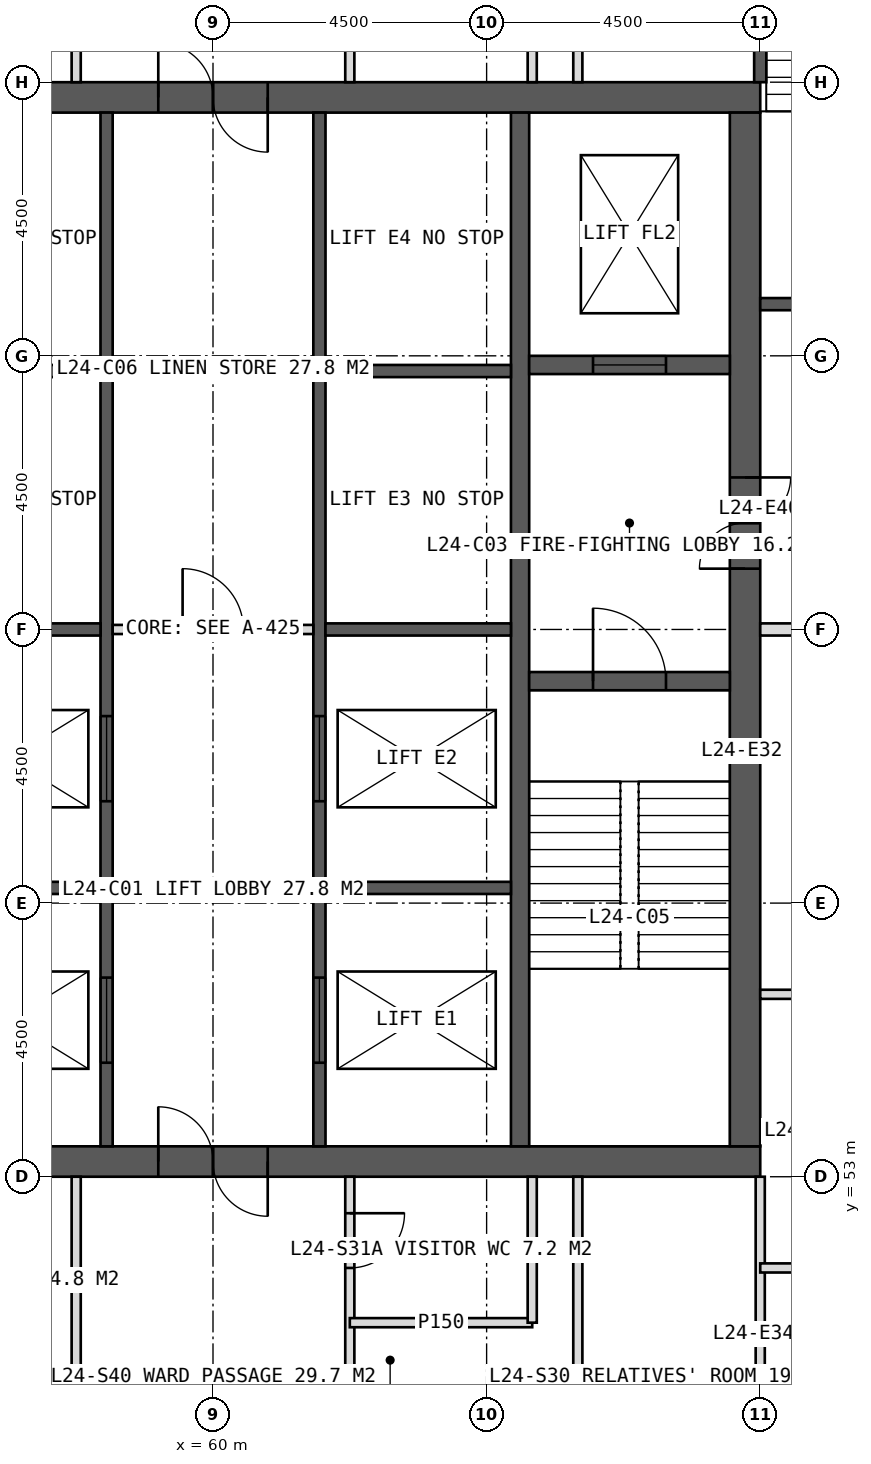
"""IFC4 building model, lengths in metres.
Left out: names, types, materials, properties, quantities, classifications, styles, units other than length and angle.
Written with IfcOpenShell. Run it as: python <this file> out.ifc"""

import sys

from ifc_helpers import new_model, si_unit, direction, frame, frame_2d, origin, place, context, subcontext, project, spatial, rectangle, extrude, element, fill, save


model = new_model("IFC4")
c1 = context("Model", 3, precision=1e-05, world=origin(), true_north=direction((0.0, 1.0)))
c2 = subcontext(c1, "Body", "Model", "MODEL_VIEW")
j1 = project(units=[si_unit("LENGTHUNIT", "METRE"), si_unit("PLANEANGLEUNIT", "RADIAN")], contexts=[c1])
p1 = place(None, origin())
s1 = spatial("IfcSite", under=j1, at=p1, CompositionType="ELEMENT")
p2 = place(p1, origin())
s2 = spatial("IfcBuilding", under=s1, at=p2, CompositionType="ELEMENT")
p3 = place(p2, frame((0.0, 0.0, 104.0)))
s3 = spatial("IfcBuildingStorey", under=s2, at=p3, CompositionType="ELEMENT", Elevation=104.0)
p4 = place(p3, frame((51.0, 70.75, 0.0), z_axis=(0.0, 0.0, 1.0), x_axis=(1.0, 0.0, 0.0)))
e1 = element("IfcWall", 1, at=p4, inside=s3, PredefinedType="SHEAR", context=c2, shape_type="SweptSolid", body=[
    extrude(rectangle(XDim=18.0, YDim=0.5, at=frame_2d((9.0, 0.0))), origin(), (0.0, 0.0, 1.0), 4.0),
])
p5 = place(p4, frame((8.1, 0.0, 0.0)))
e2 = element("IfcOpeningElement", 2, at=p5, cuts=e1, PredefinedType="OPENING", context=c2, shape_type="SweptSolid", body=[
    extrude(rectangle(XDim=1.8, YDim=2.2, at=frame_2d((0.9, 1.1))), frame((0.0, 0.26, 0.0), z_axis=(0.0, -1.0, 0.0), x_axis=(1.0, 0.0, 0.0)), (0.0, 0.0, 1.0), 0.52),
])
p6 = place(p3, frame((51.0, 53.25, 0.0), z_axis=(0.0, 0.0, 1.0), x_axis=(1.0, 0.0, 0.0)))
e3 = element("IfcWall", 3, at=p6, inside=s3, PredefinedType="SHEAR", context=c2, shape_type="SweptSolid", body=[
    extrude(rectangle(XDim=18.0, YDim=0.5, at=frame_2d((9.0, 0.0))), origin(), (0.0, 0.0, 1.0), 4.0),
])
p7 = place(p6, frame((8.1, 0.0, 0.0)))
e4 = element("IfcOpeningElement", 4, at=p7, cuts=e3, PredefinedType="OPENING", context=c2, shape_type="SweptSolid", body=[
    extrude(rectangle(XDim=1.8, YDim=2.2, at=frame_2d((0.9, 1.1))), frame((0.0, 0.26, 0.0), z_axis=(0.0, -1.0, 0.0), x_axis=(1.0, 0.0, 0.0)), (0.0, 0.0, 1.0), 0.52),
])
p8 = place(p3, frame((68.75, 53.5, 0.0), z_axis=(0.0, 0.0, 1.0), x_axis=(0.0, 1.0, 0.0)))
e5 = element("IfcWall", 5, at=p8, inside=s3, PredefinedType="SHEAR", context=c2, shape_type="SweptSolid", body=[
    extrude(rectangle(XDim=17.0, YDim=0.5, at=frame_2d((8.5, 0.0))), origin(), (0.0, 0.0, 1.0), 4.0),
])
p9 = place(p8, frame((9.5, 0.0, 0.0)))
e6 = element("IfcOpeningElement", 6, at=p9, cuts=e5, PredefinedType="OPENING", context=c2, shape_type="SweptSolid", body=[
    extrude(rectangle(XDim=1.5, YDim=2.2, at=frame_2d((0.75, 1.1))), frame((0.0, 0.26, 0.0), z_axis=(0.0, -1.0, 0.0), x_axis=(1.0, 0.0, 0.0)), (0.0, 0.0, 1.0), 0.52),
])
p10 = place(p3, frame((65.05, 53.5, 0.0), z_axis=(0.0, 0.0, 1.0), x_axis=(0.0, 1.0, 0.0)))
e7 = element("IfcWall", 7, at=p10, inside=s3, PredefinedType="SHEAR", context=c2, shape_type="SweptSolid", body=[
    extrude(rectangle(XDim=17.0, YDim=0.3, at=frame_2d((8.5, 0.0))), origin(), (0.0, 0.0, 1.0), 4.0),
])
p11 = place(p3, frame((58.25, 53.5, 0.0), z_axis=(0.0, 0.0, 1.0), x_axis=(0.0, 1.0, 0.0)))
e8 = element("IfcWall", 8, at=p11, inside=s3, PredefinedType="SHEAR", context=c2, shape_type="SweptSolid", body=[
    extrude(rectangle(XDim=17.0, YDim=0.2, at=frame_2d((8.5, 0.0))), origin(), (0.0, 0.0, 1.0), 4.0),
])
p12 = place(p11, frame((1.375, 0.0, 0.0)))
e9 = element("IfcOpeningElement", 9, at=p12, cuts=e8, PredefinedType="OPENING", context=c2, shape_type="SweptSolid", body=[
    extrude(rectangle(XDim=1.4, YDim=2.2, at=frame_2d((0.7, 1.1))), frame((0.0, 0.11, 0.0), z_axis=(0.0, -1.0, 0.0), x_axis=(1.0, 0.0, 0.0)), (0.0, 0.0, 1.0), 0.22),
])
p13 = place(p11, frame((5.675, 0.0, 0.0)))
e10 = element("IfcOpeningElement", 10, at=p13, cuts=e8, PredefinedType="OPENING", context=c2, shape_type="SweptSolid", body=[
    extrude(rectangle(XDim=1.4, YDim=2.2, at=frame_2d((0.7, 1.1))), frame((0.0, 0.11, 0.0), z_axis=(0.0, -1.0, 0.0), x_axis=(1.0, 0.0, 0.0)), (0.0, 0.0, 1.0), 0.22),
])
p14 = place(p3, frame((61.75, 53.5, 0.0), z_axis=(0.0, 0.0, 1.0), x_axis=(0.0, 1.0, 0.0)))
e11 = element("IfcWall", 11, at=p14, inside=s3, PredefinedType="SHEAR", context=c2, shape_type="SweptSolid", body=[
    extrude(rectangle(XDim=17.0, YDim=0.2, at=frame_2d((8.5, 0.0))), origin(), (0.0, 0.0, 1.0), 4.0),
])
p15 = place(p14, frame((1.375, 0.0, 0.0)))
e12 = element("IfcOpeningElement", 12, at=p15, cuts=e11, PredefinedType="OPENING", context=c2, shape_type="SweptSolid", body=[
    extrude(rectangle(XDim=1.4, YDim=2.2, at=frame_2d((0.7, 1.1))), frame((0.0, 0.11, 0.0), z_axis=(0.0, -1.0, 0.0), x_axis=(1.0, 0.0, 0.0)), (0.0, 0.0, 1.0), 0.22),
])
p16 = place(p14, frame((5.675, 0.0, 0.0)))
e13 = element("IfcOpeningElement", 13, at=p16, cuts=e11, PredefinedType="OPENING", context=c2, shape_type="SweptSolid", body=[
    extrude(rectangle(XDim=1.4, YDim=2.2, at=frame_2d((0.7, 1.1))), frame((0.0, 0.11, 0.0), z_axis=(0.0, -1.0, 0.0), x_axis=(1.0, 0.0, 0.0)), (0.0, 0.0, 1.0), 0.22),
])
for number, where, z_axis, x_axis in (
    (14, (55.1, 57.75, 0.0), (0.0, 0.0, 1.0), (1.0, 0.0, 0.0)),
    (15, (61.85, 57.75, 0.0), (0.0, 0.0, 1.0), (1.0, 0.0, 0.0)),
    (16, (55.1, 62.0, 0.0), (0.0, 0.0, 1.0), (1.0, 0.0, 0.0)),
    (17, (61.85, 62.0, 0.0), (0.0, 0.0, 1.0), (1.0, 0.0, 0.0)),
    (18, (55.1, 66.25, 0.0), (0.0, 0.0, 1.0), (1.0, 0.0, 0.0)),
    (19, (61.85, 66.25, 0.0), (0.0, 0.0, 1.0), (1.0, 0.0, 0.0)),
):
    element("IfcWall", number, at=place(p3, frame(where, z_axis=z_axis, x_axis=x_axis)), inside=s3, PredefinedType="SHEAR", context=c2, shape_type="SweptSolid", body=[
        extrude(rectangle(XDim=3.05, YDim=0.2, at=frame_2d((1.525, 0.0))), origin(), (0.0, 0.0, 1.0), 4.0),
    ])
p17 = place(p3, frame((65.2, 61.15, 0.0), z_axis=(0.0, 0.0, 1.0), x_axis=(1.0, 0.0, 0.0)))
e20 = element("IfcWall", 20, at=p17, inside=s3, PredefinedType="SHEAR", context=c2, shape_type="SweptSolid", body=[
    extrude(rectangle(XDim=3.3, YDim=0.3, at=frame_2d((1.65, 0.0))), origin(), (0.0, 0.0, 1.0), 4.0),
])
p18 = place(p17, frame((1.05, 0.0, 0.0)))
e21 = element("IfcOpeningElement", 21, at=p18, cuts=e20, PredefinedType="OPENING", context=c2, shape_type="SweptSolid", body=[
    extrude(rectangle(XDim=1.2, YDim=2.1, at=frame_2d((0.6, 1.05))), frame((0.0, 0.16, 0.0), z_axis=(0.0, -1.0, 0.0), x_axis=(1.0, 0.0, 0.0)), (0.0, 0.0, 1.0), 0.32),
])
p19 = place(p3, frame((65.2, 66.35, 0.0), z_axis=(0.0, 0.0, 1.0), x_axis=(1.0, 0.0, 0.0)))
e22 = element("IfcWall", 22, at=p19, inside=s3, PredefinedType="SHEAR", context=c2, shape_type="SweptSolid", body=[
    extrude(rectangle(XDim=3.3, YDim=0.3, at=frame_2d((1.65, 0.0))), origin(), (0.0, 0.0, 1.0), 4.0),
])
p20 = place(p19, frame((1.05, 0.0, 0.0)))
e23 = element("IfcOpeningElement", 23, at=p20, cuts=e22, PredefinedType="OPENING", context=c2, shape_type="SweptSolid", body=[
    extrude(rectangle(XDim=1.2, YDim=2.2, at=frame_2d((0.6, 1.1))), frame((0.0, 0.16, 0.0), z_axis=(0.0, -1.0, 0.0), x_axis=(1.0, 0.0, 0.0)), (0.0, 0.0, 1.0), 0.32),
])
p21 = place(p3, frame((57.75, 71.0, 0.0), z_axis=(0.0, 0.0, 1.0), x_axis=(0.0, 1.0, 0.0)))
e24 = element("IfcWall", 24, at=p21, inside=s3, PredefinedType="PARTITIONING", context=c2, shape_type="SweptSolid", body=[
    extrude(rectangle(XDim=6.6, YDim=0.15, at=frame_2d((3.3, 0.0))), origin(), (0.0, 0.0, 1.0), 3.75),
])
p22 = place(p21, frame((0.6, 0.0, 0.0)))
e25 = element("IfcOpeningElement", 25, at=p22, cuts=e24, PredefinedType="OPENING", context=c2, shape_type="SweptSolid", body=[
    extrude(rectangle(XDim=0.9, YDim=2.1, at=frame_2d((0.45, 1.05))), frame((0.0, 0.085, 0.0), z_axis=(0.0, -1.0, 0.0), x_axis=(1.0, 0.0, 0.0)), (0.0, 0.0, 1.0), 0.17),
])
p23 = place(p3, frame((62.25, 71.0, 0.0), z_axis=(0.0, 0.0, 1.0), x_axis=(0.0, 1.0, 0.0)))
e26 = element("IfcWall", 26, at=p23, inside=s3, PredefinedType="PARTITIONING", context=c2, shape_type="SweptSolid", body=[
    extrude(rectangle(XDim=6.6, YDim=0.15, at=frame_2d((3.3, 0.0))), origin(), (0.0, 0.0, 1.0), 3.75),
])
p24 = place(p23, frame((0.6, 0.0, 0.0)))
e27 = element("IfcOpeningElement", 27, at=p24, cuts=e26, PredefinedType="OPENING", context=c2, shape_type="SweptSolid", body=[
    extrude(rectangle(XDim=0.9, YDim=2.1, at=frame_2d((0.45, 1.05))), frame((0.0, 0.085, 0.0), z_axis=(0.0, -1.0, 0.0), x_axis=(1.0, 0.0, 0.0)), (0.0, 0.0, 1.0), 0.17),
])
p25 = place(p3, frame((66.0, 71.0, 0.0), z_axis=(0.0, 0.0, 1.0), x_axis=(0.0, 1.0, 0.0)))
e28 = element("IfcWall", 28, at=p25, inside=s3, PredefinedType="PARTITIONING", context=c2, shape_type="SweptSolid", body=[
    extrude(rectangle(XDim=6.6, YDim=0.15, at=frame_2d((3.3, 0.0))), origin(), (0.0, 0.0, 1.0), 3.75),
])
p26 = place(p3, frame((65.25, 71.0, 0.0), z_axis=(0.0, 0.0, 1.0), x_axis=(0.0, 1.0, 0.0)))
e29 = element("IfcWall", 29, at=p26, inside=s3, PredefinedType="PARTITIONING", context=c2, shape_type="SweptSolid", body=[
    extrude(rectangle(XDim=2.4, YDim=0.15, at=frame_2d((1.2, 0.0))), origin(), (0.0, 0.0, 1.0), 3.75),
])
p27 = place(p3, frame((69.0, 53.0, 0.0), z_axis=(0.0, 0.0, 1.0), x_axis=(0.0, -1.0, 0.0)))
e30 = element("IfcWall", 30, at=p27, inside=s3, PredefinedType="PARTITIONING", context=c2, shape_type="SweptSolid", body=[
    extrude(rectangle(XDim=6.6, YDim=0.15, at=frame_2d((3.3, 0.0))), origin(), (0.0, 0.0, 1.0), 3.75),
])
p28 = place(p3, frame((62.25, 53.0, 0.0), z_axis=(0.0, 0.0, 1.0), x_axis=(0.0, -1.0, 0.0)))
e31 = element("IfcWall", 31, at=p28, inside=s3, PredefinedType="PARTITIONING", context=c2, shape_type="SweptSolid", body=[
    extrude(rectangle(XDim=6.6, YDim=0.15, at=frame_2d((3.3, 0.0))), origin(), (0.0, 0.0, 1.0), 3.75),
])
p29 = place(p28, frame((0.6, 0.0, 0.0)))
e32 = element("IfcOpeningElement", 32, at=p29, cuts=e31, PredefinedType="OPENING", context=c2, shape_type="SweptSolid", body=[
    extrude(rectangle(XDim=0.9, YDim=2.1, at=frame_2d((0.45, 1.05))), frame((0.0, 0.085, 0.0), z_axis=(0.0, -1.0, 0.0), x_axis=(1.0, 0.0, 0.0)), (0.0, 0.0, 1.0), 0.17),
])
for number, where, z_axis, x_axis in (
    (33, (57.75, 53.0, 0.0), (0.0, 0.0, 1.0), (0.0, -1.0, 0.0)),
    (34, (66.0, 53.0, 0.0), (0.0, 0.0, 1.0), (0.0, -1.0, 0.0)),
):
    element("IfcWall", number, at=place(p3, frame(where, z_axis=z_axis, x_axis=x_axis)), inside=s3, PredefinedType="PARTITIONING", context=c2, shape_type="SweptSolid", body=[
        extrude(rectangle(XDim=6.6, YDim=0.15, at=frame_2d((3.3, 0.0))), origin(), (0.0, 0.0, 1.0), 3.75),
    ])
p30 = place(p3, frame((65.25, 50.6, 0.0), z_axis=(0.0, 0.0, 1.0), x_axis=(-1.0, 0.0, 0.0)))
e35 = element("IfcWall", 35, at=p30, inside=s3, PredefinedType="PARTITIONING", context=c2, shape_type="SweptSolid", body=[
    extrude(rectangle(XDim=3.0, YDim=0.15, at=frame_2d((1.5, 0.0))), origin(), (0.0, 0.0, 1.0), 3.75),
])
p31 = place(p3, frame((65.25, 53.0, 0.0), z_axis=(0.0, 0.0, 1.0), x_axis=(0.0, -1.0, 0.0)))
e36 = element("IfcWall", 36, at=p31, inside=s3, PredefinedType="PARTITIONING", context=c2, shape_type="SweptSolid", body=[
    extrude(rectangle(XDim=2.4, YDim=0.15, at=frame_2d((1.2, 0.0))), origin(), (0.0, 0.0, 1.0), 3.75),
])
p32 = place(p3, frame((69.0, 62.0, 0.0), z_axis=(0.0, 0.0, 1.0), x_axis=(1.0, 0.0, 0.0)))
e37 = element("IfcWall", 37, at=p32, inside=s3, PredefinedType="SOLIDWALL", context=c2, shape_type="SweptSolid", body=[
    extrude(rectangle(XDim=6.6, YDim=0.2, at=frame_2d((3.3, 0.0))), origin(), (0.0, 0.0, 1.0), 2.95),
])
for number, where, z_axis, x_axis in (
    (38, (69.0, 56.0, 0.0), (0.0, 0.0, 1.0), (1.0, 0.0, 0.0)),
    (39, (69.0, 51.5, 0.0), (0.0, 0.0, 1.0), (1.0, 0.0, 0.0)),
):
    element("IfcWall", number, at=place(p3, frame(where, z_axis=z_axis, x_axis=x_axis)), inside=s3, PredefinedType="PARTITIONING", context=c2, shape_type="SweptSolid", body=[
        extrude(rectangle(XDim=6.6, YDim=0.15, at=frame_2d((3.3, 0.0))), origin(), (0.0, 0.0, 1.0), 3.75),
    ])
p33 = place(p3, frame((58.35, 62.0, 0.0), z_axis=(0.0, 0.0, 1.0), x_axis=(1.0, 0.0, 0.0)))
e40 = element("IfcWall", 40, at=p33, inside=s3, PredefinedType="PARTITIONING", context=c2, shape_type="SweptSolid", body=[
    extrude(rectangle(XDim=3.3, YDim=0.15, at=frame_2d((1.65, 0.0))), origin(), (0.0, 0.0, 1.0), 3.75),
])
p34 = place(p33, frame((1.15, 0.0, 0.0)))
e41 = element("IfcOpeningElement", 41, at=p34, cuts=e40, PredefinedType="OPENING", context=c2, shape_type="SweptSolid", body=[
    extrude(rectangle(XDim=1.0, YDim=2.1, at=frame_2d((0.5, 1.05))), frame((0.0, 0.085, 0.0), z_axis=(0.0, -1.0, 0.0), x_axis=(1.0, 0.0, 0.0)), (0.0, 0.0, 1.0), 0.17),
])
p35 = place(p3, frame((69.0, 71.0, 0.0), z_axis=(0.0, 0.0, 1.0), x_axis=(0.0, 1.0, 0.0)))
e42 = element("IfcWall", 42, at=p35, inside=s3, PredefinedType="SOLIDWALL", context=c2, shape_type="SweptSolid", body=[
    extrude(rectangle(XDim=4.1, YDim=0.2, at=frame_2d((2.05, 0.0))), origin(), (0.0, 0.0, 1.0), 3.75),
])
p36 = place(p3, frame((69.0, 67.35, 0.0), z_axis=(0.0, 0.0, 1.0), x_axis=(1.0, 0.0, 0.0)))
e43 = element("IfcWall", 43, at=p36, inside=s3, PredefinedType="SOLIDWALL", context=c2, shape_type="SweptSolid", body=[
    extrude(rectangle(XDim=3.5, YDim=0.2, at=frame_2d((1.75, 0.0))), origin(), (0.0, 0.0, 1.0), 3.75),
])
p37 = place(p29, origin())
e44 = element("IfcDoor", 44, at=p37, inside=s3, OperationType="SINGLE_SWING_LEFT", PredefinedType="DOOR", context=c2, shape_type="SweptSolid", body=[
    extrude(rectangle(XDim=0.9, YDim=2.1, at=frame_2d((0.45, 1.05))), frame((0.0, 0.025, 0.0), z_axis=(0.0, -1.0, 0.0), x_axis=(1.0, 0.0, 0.0)), (0.0, 0.0, 1.0), 0.05),
])
fill(e32, e44)
p38 = place(p7, origin())
e45 = element("IfcDoor", 45, at=p38, inside=s3, OperationType="DOUBLE_DOOR_SINGLE_SWING", PredefinedType="DOOR", context=c2, shape_type="SweptSolid", body=[
    extrude(rectangle(XDim=1.8, YDim=2.2, at=frame_2d((0.9, 1.1))), frame((0.0, 0.025, 0.0), z_axis=(0.0, -1.0, 0.0), x_axis=(1.0, 0.0, 0.0)), (0.0, 0.0, 1.0), 0.05),
])
fill(e4, e45)
p39 = place(p9, origin())
e46 = element("IfcDoor", 46, at=p39, inside=s3, OperationType="DOUBLE_DOOR_SINGLE_SWING", PredefinedType="DOOR", context=c2, shape_type="SweptSolid", body=[
    extrude(rectangle(XDim=1.5, YDim=2.2, at=frame_2d((0.75, 1.1))), frame((0.0, 0.025, 0.0), z_axis=(0.0, -1.0, 0.0), x_axis=(1.0, 0.0, 0.0)), (0.0, 0.0, 1.0), 0.05),
])
fill(e6, e46)
p40 = place(p18, origin())
e47 = element("IfcDoor", 47, at=p40, inside=s3, OperationType="SINGLE_SWING_LEFT", PredefinedType="DOOR", context=c2, shape_type="SweptSolid", body=[
    extrude(rectangle(XDim=1.2, YDim=2.1, at=frame_2d((0.6, 1.05))), frame((0.0, 0.025, 0.0), z_axis=(0.0, -1.0, 0.0), x_axis=(1.0, 0.0, 0.0)), (0.0, 0.0, 1.0), 0.05),
])
fill(e21, e47)
p41 = place(p20, origin())
e48 = element("IfcDoor", 48, at=p41, inside=s3, OperationType="SLIDING_TO_LEFT", PredefinedType="DOOR", context=c2, shape_type="SweptSolid", body=[
    extrude(rectangle(XDim=1.2, YDim=2.2, at=frame_2d((0.6, 1.1))), frame((0.0, 0.025, 0.0), z_axis=(0.0, -1.0, 0.0), x_axis=(1.0, 0.0, 0.0)), (0.0, 0.0, 1.0), 0.05),
])
fill(e23, e48)
p42 = place(p12, origin())
e49 = element("IfcDoor", 49, at=p42, inside=s3, OperationType="SLIDING_TO_LEFT", PredefinedType="DOOR", context=c2, shape_type="SweptSolid", body=[
    extrude(rectangle(XDim=1.4, YDim=2.2, at=frame_2d((0.7, 1.1))), frame((0.0, 0.025, 0.0), z_axis=(0.0, -1.0, 0.0), x_axis=(1.0, 0.0, 0.0)), (0.0, 0.0, 1.0), 0.05),
])
fill(e9, e49)
p43 = place(p15, origin())
e50 = element("IfcDoor", 50, at=p43, inside=s3, OperationType="SLIDING_TO_LEFT", PredefinedType="DOOR", context=c2, shape_type="SweptSolid", body=[
    extrude(rectangle(XDim=1.4, YDim=2.2, at=frame_2d((0.7, 1.1))), frame((0.0, 0.025, 0.0), z_axis=(0.0, -1.0, 0.0), x_axis=(1.0, 0.0, 0.0)), (0.0, 0.0, 1.0), 0.05),
])
fill(e12, e50)
p44 = place(p13, origin())
e51 = element("IfcDoor", 51, at=p44, inside=s3, OperationType="SLIDING_TO_LEFT", PredefinedType="DOOR", context=c2, shape_type="SweptSolid", body=[
    extrude(rectangle(XDim=1.4, YDim=2.2, at=frame_2d((0.7, 1.1))), frame((0.0, 0.025, 0.0), z_axis=(0.0, -1.0, 0.0), x_axis=(1.0, 0.0, 0.0)), (0.0, 0.0, 1.0), 0.05),
])
fill(e10, e51)
p45 = place(p16, origin())
e52 = element("IfcDoor", 52, at=p45, inside=s3, OperationType="SLIDING_TO_LEFT", PredefinedType="DOOR", context=c2, shape_type="SweptSolid", body=[
    extrude(rectangle(XDim=1.4, YDim=2.2, at=frame_2d((0.7, 1.1))), frame((0.0, 0.025, 0.0), z_axis=(0.0, -1.0, 0.0), x_axis=(1.0, 0.0, 0.0)), (0.0, 0.0, 1.0), 0.05),
])
fill(e13, e52)
p46 = place(p34, origin())
e53 = element("IfcDoor", 53, at=p46, inside=s3, OperationType="SINGLE_SWING_LEFT", PredefinedType="DOOR", context=c2, shape_type="SweptSolid", body=[
    extrude(rectangle(XDim=1.0, YDim=2.1, at=frame_2d((0.5, 1.05))), frame((0.0, 0.025, 0.0), z_axis=(0.0, -1.0, 0.0), x_axis=(1.0, 0.0, 0.0)), (0.0, 0.0, 1.0), 0.05),
])
fill(e41, e53)
p47 = place(p5, origin())
e54 = element("IfcDoor", 54, at=p47, inside=s3, OperationType="DOUBLE_DOOR_SINGLE_SWING", PredefinedType="DOOR", context=c2, shape_type="SweptSolid", body=[
    extrude(rectangle(XDim=1.8, YDim=2.2, at=frame_2d((0.9, 1.1))), frame((0.0, 0.025, 0.0), z_axis=(0.0, -1.0, 0.0), x_axis=(1.0, 0.0, 0.0)), (0.0, 0.0, 1.0), 0.05),
])
fill(e2, e54)
save(model, sys.argv[1])
